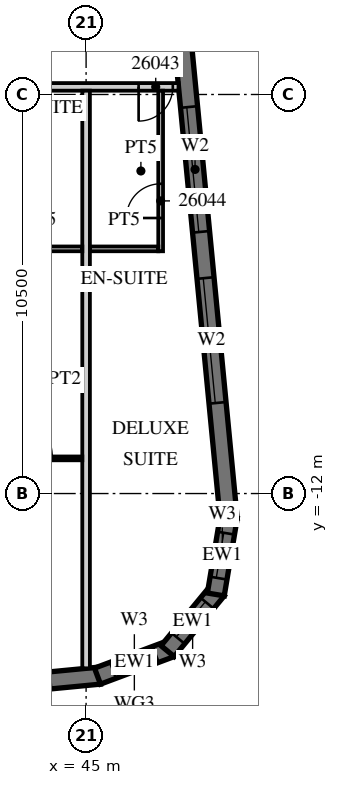
"""IFC4 building model, lengths in metres.
Left out: names, types, materials, properties, quantities, classifications, styles, units other than length and angle.
Written with IfcOpenShell. Run it as: python <this file> out.ifc"""

import sys

from ifc_helpers import new_model, si_unit, direction, frame, frame_2d, origin, place, context, subcontext, project, spatial, polyline, rectangle, outline, extrude, element, fill, save


model = new_model("IFC4")
c1 = context("Model", 3, precision=1e-05, world=origin(), true_north=direction((0.0, 1.0)))
c2 = subcontext(c1, "Body", "Model", "MODEL_VIEW")
j1 = project(units=[si_unit("LENGTHUNIT", "METRE"), si_unit("PLANEANGLEUNIT", "RADIAN")], contexts=[c1])
p1 = place(None, origin())
s1 = spatial("IfcSite", under=j1, at=p1, CompositionType="ELEMENT")
p2 = place(p1, origin())
s2 = spatial("IfcBuilding", under=s1, at=p2, CompositionType="ELEMENT")
p3 = place(p2, frame((0.0, 0.0, 120.7)))
s3 = spatial("IfcBuildingStorey", under=s2, at=p3, CompositionType="ELEMENT", Elevation=120.7)
p4 = place(p3, frame((-13.521, -22.46, 0.0), z_axis=(0.0, 0.0, 1.0), x_axis=(0.995396096335, 0.095846812164, 0.0)))
e1 = element("IfcWall", 1, at=p4, inside=s3, PredefinedType="SOLIDWALL", context=c2, shape_type="SweptSolid", body=[
    extrude(rectangle(XDim=59.151, YDim=0.45, at=frame_2d((29.575, 0.0))), origin(), (0.0, 0.0, 1.0), 3.02),
])
p5 = place(p4, frame((0.91, 0.0, 0.45)))
e2 = element("IfcOpeningElement", 2, at=p5, cuts=e1, PredefinedType="OPENING", context=c2, shape_type="SweptSolid", body=[
    extrude(rectangle(XDim=2.7, YDim=2.25, at=frame_2d((1.35, 1.125))), frame((0.0, 0.235, 0.0), z_axis=(0.0, -1.0, 0.0), x_axis=(1.0, 0.0, 0.0)), (0.0, 0.0, 1.0), 0.47),
])
p6 = place(p4, frame((5.431, 0.0, 0.45)))
e3 = element("IfcOpeningElement", 3, at=p6, cuts=e1, PredefinedType="OPENING", context=c2, shape_type="SweptSolid", body=[
    extrude(rectangle(XDim=2.7, YDim=2.25, at=frame_2d((1.35, 1.125))), frame((0.0, 0.235, 0.0), z_axis=(0.0, -1.0, 0.0), x_axis=(1.0, 0.0, 0.0)), (0.0, 0.0, 1.0), 0.47),
])
p7 = place(p4, frame((9.952, 0.0, 0.45)))
e4 = element("IfcOpeningElement", 4, at=p7, cuts=e1, PredefinedType="OPENING", context=c2, shape_type="SweptSolid", body=[
    extrude(rectangle(XDim=2.7, YDim=2.25, at=frame_2d((1.35, 1.125))), frame((0.0, 0.235, 0.0), z_axis=(0.0, -1.0, 0.0), x_axis=(1.0, 0.0, 0.0)), (0.0, 0.0, 1.0), 0.47),
])
p8 = place(p4, frame((14.473, 0.0, 0.45)))
e5 = element("IfcOpeningElement", 5, at=p8, cuts=e1, PredefinedType="OPENING", context=c2, shape_type="SweptSolid", body=[
    extrude(rectangle(XDim=2.7, YDim=2.25, at=frame_2d((1.35, 1.125))), frame((0.0, 0.235, 0.0), z_axis=(0.0, -1.0, 0.0), x_axis=(1.0, 0.0, 0.0)), (0.0, 0.0, 1.0), 0.47),
])
p9 = place(p4, frame((18.994, 0.0, 0.45)))
e6 = element("IfcOpeningElement", 6, at=p9, cuts=e1, PredefinedType="OPENING", context=c2, shape_type="SweptSolid", body=[
    extrude(rectangle(XDim=2.7, YDim=2.25, at=frame_2d((1.35, 1.125))), frame((0.0, 0.235, 0.0), z_axis=(0.0, -1.0, 0.0), x_axis=(1.0, 0.0, 0.0)), (0.0, 0.0, 1.0), 0.47),
])
p10 = place(p4, frame((23.514, 0.0, 0.45)))
e7 = element("IfcOpeningElement", 7, at=p10, cuts=e1, PredefinedType="OPENING", context=c2, shape_type="SweptSolid", body=[
    extrude(rectangle(XDim=2.7, YDim=2.25, at=frame_2d((1.35, 1.125))), frame((0.0, 0.235, 0.0), z_axis=(0.0, -1.0, 0.0), x_axis=(1.0, 0.0, 0.0)), (0.0, 0.0, 1.0), 0.47),
])
p11 = place(p4, frame((28.035, 0.0, 0.45)))
e8 = element("IfcOpeningElement", 8, at=p11, cuts=e1, PredefinedType="OPENING", context=c2, shape_type="SweptSolid", body=[
    extrude(rectangle(XDim=2.7, YDim=2.25, at=frame_2d((1.35, 1.125))), frame((0.0, 0.235, 0.0), z_axis=(0.0, -1.0, 0.0), x_axis=(1.0, 0.0, 0.0)), (0.0, 0.0, 1.0), 0.47),
])
p12 = place(p4, frame((32.556, 0.0, 0.45)))
e9 = element("IfcOpeningElement", 9, at=p12, cuts=e1, PredefinedType="OPENING", context=c2, shape_type="SweptSolid", body=[
    extrude(rectangle(XDim=2.7, YDim=2.25, at=frame_2d((1.35, 1.125))), frame((0.0, 0.235, 0.0), z_axis=(0.0, -1.0, 0.0), x_axis=(1.0, 0.0, 0.0)), (0.0, 0.0, 1.0), 0.47),
])
p13 = place(p4, frame((37.077, 0.0, 0.45)))
e10 = element("IfcOpeningElement", 10, at=p13, cuts=e1, PredefinedType="OPENING", context=c2, shape_type="SweptSolid", body=[
    extrude(rectangle(XDim=2.7, YDim=2.25, at=frame_2d((1.35, 1.125))), frame((0.0, 0.235, 0.0), z_axis=(0.0, -1.0, 0.0), x_axis=(1.0, 0.0, 0.0)), (0.0, 0.0, 1.0), 0.47),
])
p14 = place(p4, frame((41.598, 0.0, 0.45)))
e11 = element("IfcOpeningElement", 11, at=p14, cuts=e1, PredefinedType="OPENING", context=c2, shape_type="SweptSolid", body=[
    extrude(rectangle(XDim=2.7, YDim=2.25, at=frame_2d((1.35, 1.125))), frame((0.0, 0.235, 0.0), z_axis=(0.0, -1.0, 0.0), x_axis=(1.0, 0.0, 0.0)), (0.0, 0.0, 1.0), 0.47),
])
p15 = place(p4, frame((46.118, 0.0, 0.45)))
e12 = element("IfcOpeningElement", 12, at=p15, cuts=e1, PredefinedType="OPENING", context=c2, shape_type="SweptSolid", body=[
    extrude(rectangle(XDim=2.7, YDim=2.25, at=frame_2d((1.35, 1.125))), frame((0.0, 0.235, 0.0), z_axis=(0.0, -1.0, 0.0), x_axis=(1.0, 0.0, 0.0)), (0.0, 0.0, 1.0), 0.47),
])
p16 = place(p4, frame((50.639, 0.0, 0.45)))
e13 = element("IfcOpeningElement", 13, at=p16, cuts=e1, PredefinedType="OPENING", context=c2, shape_type="SweptSolid", body=[
    extrude(rectangle(XDim=2.7, YDim=2.25, at=frame_2d((1.35, 1.125))), frame((0.0, 0.235, 0.0), z_axis=(0.0, -1.0, 0.0), x_axis=(1.0, 0.0, 0.0)), (0.0, 0.0, 1.0), 0.47),
])
p17 = place(p4, frame((55.15, 0.0, 0.45)))
e14 = element("IfcOpeningElement", 14, at=p17, cuts=e1, PredefinedType="OPENING", context=c2, shape_type="SweptSolid", body=[
    extrude(rectangle(XDim=2.7, YDim=2.25, at=frame_2d((1.35, 1.125))), frame((0.0, 0.235, 0.0), z_axis=(0.0, -1.0, 0.0), x_axis=(1.0, 0.0, 0.0)), (0.0, 0.0, 1.0), 0.47),
])
p18 = place(p3, frame((45.3, -16.804, 0.0), z_axis=(0.0, 0.0, 1.0), x_axis=(0.936677599948, 0.350192909346, 0.0)))
e15 = element("IfcWall", 15, at=p18, inside=s3, PredefinedType="SOLIDWALL", context=c2, shape_type="SweptSolid", body=[
    extrude(outline(polyline([(0.0, -0.225), (2.071, -0.225), (1.95, 0.225), (0.121, 0.225), (0.0, -0.225)])), origin(), (0.0, 0.0, 1.0), 3.02),
])
p19 = place(p18, frame((0.435, 0.0, 0.45)))
e16 = element("IfcOpeningElement", 16, at=p19, cuts=e15, PredefinedType="OPENING", context=c2, shape_type="SweptSolid", body=[
    extrude(rectangle(XDim=1.2, YDim=2.25, at=frame_2d((0.6, 1.125))), frame((0.0, 0.235, 0.0), z_axis=(0.0, -1.0, 0.0), x_axis=(1.0, 0.0, 0.0)), (0.0, 0.0, 1.0), 0.47),
])
p20 = place(p3, frame((47.145, -16.147, 0.0), z_axis=(0.0, 0.0, 1.0), x_axis=(0.635988241739, 0.771698747161, 0.0)))
e17 = element("IfcWall", 17, at=p20, inside=s3, PredefinedType="SOLIDWALL", context=c2, shape_type="SweptSolid", body=[
    extrude(outline(polyline([(0.0, -0.225), (2.071, -0.225), (1.95, 0.225), (0.121, 0.225), (0.0, -0.225)])), origin(), (0.0, 0.0, 1.0), 3.02),
])
p21 = place(p20, frame((0.435, 0.0, 0.45)))
e18 = element("IfcOpeningElement", 18, at=p21, cuts=e17, PredefinedType="OPENING", context=c2, shape_type="SweptSolid", body=[
    extrude(rectangle(XDim=1.2, YDim=2.25, at=frame_2d((0.6, 1.125))), frame((0.0, 0.235, 0.0), z_axis=(0.0, -1.0, 0.0), x_axis=(1.0, 0.0, 0.0)), (0.0, 0.0, 1.0), 0.47),
])
p22 = place(p3, frame((48.413, -14.655, 0.0), z_axis=(0.0, 0.0, 1.0), x_axis=(0.165068144653, 0.986282164302, 0.0)))
e19 = element("IfcWall", 19, at=p22, inside=s3, PredefinedType="SOLIDWALL", context=c2, shape_type="SweptSolid", body=[
    extrude(outline(polyline([(0.0, -0.225), (2.071, -0.225), (1.95, 0.225), (0.121, 0.225), (0.0, -0.225)])), origin(), (0.0, 0.0, 1.0), 3.02),
])
p23 = place(p22, frame((0.435, 0.0, 0.45)))
e20 = element("IfcOpeningElement", 20, at=p23, cuts=e19, PredefinedType="OPENING", context=c2, shape_type="SweptSolid", body=[
    extrude(rectangle(XDim=1.2, YDim=2.25, at=frame_2d((0.6, 1.125))), frame((0.0, 0.235, 0.0), z_axis=(0.0, -1.0, 0.0), x_axis=(1.0, 0.0, 0.0)), (0.0, 0.0, 1.0), 0.47),
])
p24 = place(p3, frame((48.753, -12.672, 0.0), z_axis=(0.0, 0.0, 1.0), x_axis=(-0.095842661909, 0.995396495954, 0.0)))
e21 = element("IfcWall", 21, at=p24, inside=s3, PredefinedType="SOLIDWALL", context=c2, shape_type="SweptSolid", body=[
    extrude(rectangle(XDim=35.0, YDim=0.45, at=frame_2d((17.5, 0.0))), origin(), (0.0, 0.0, 1.0), 3.02),
])
p25 = place(p24, frame((3.072, 0.0, 0.45)))
e22 = element("IfcOpeningElement", 22, at=p25, cuts=e21, PredefinedType="OPENING", context=c2, shape_type="SweptSolid", body=[
    extrude(rectangle(XDim=3.3, YDim=2.25, at=frame_2d((1.65, 1.125))), frame((0.0, 0.235, 0.0), z_axis=(0.0, -1.0, 0.0), x_axis=(1.0, 0.0, 0.0)), (0.0, 0.0, 1.0), 0.47),
])
p26 = place(p24, frame((7.593, 0.0, 0.45)))
e23 = element("IfcOpeningElement", 23, at=p26, cuts=e21, PredefinedType="OPENING", context=c2, shape_type="SweptSolid", body=[
    extrude(rectangle(XDim=3.3, YDim=2.25, at=frame_2d((1.65, 1.125))), frame((0.0, 0.235, 0.0), z_axis=(0.0, -1.0, 0.0), x_axis=(1.0, 0.0, 0.0)), (0.0, 0.0, 1.0), 0.47),
])
p27 = place(p3, frame((-13.5, -1.3, 0.0), z_axis=(0.0, 0.0, 1.0), x_axis=(1.0, 0.0, 0.0)))
e24 = element("IfcWall", 24, at=p27, inside=s3, PredefinedType="PARTITIONING", context=c2, shape_type="SweptSolid", body=[
    extrude(rectangle(XDim=60.932, YDim=0.2, at=frame_2d((30.466, 0.0))), origin(), (0.0, 0.0, 1.0), 3.02),
])
p28 = place(p27, frame((2.925, 0.0, 0.0)))
e25 = element("IfcOpeningElement", 25, at=p28, cuts=e24, PredefinedType="OPENING", context=c2, shape_type="SweptSolid", body=[
    extrude(rectangle(XDim=1.0, YDim=2.1, at=frame_2d((0.5, 1.05))), frame((0.0, 0.11, 0.0), z_axis=(0.0, -1.0, 0.0), x_axis=(1.0, 0.0, 0.0)), (0.0, 0.0, 1.0), 0.22),
])
p29 = place(p27, frame((9.863, 0.0, 0.0)))
e26 = element("IfcOpeningElement", 26, at=p29, cuts=e24, PredefinedType="OPENING", context=c2, shape_type="SweptSolid", body=[
    extrude(rectangle(XDim=1.2, YDim=2.1, at=frame_2d((0.6, 1.05))), frame((0.0, 0.11, 0.0), z_axis=(0.0, -1.0, 0.0), x_axis=(1.0, 0.0, 0.0)), (0.0, 0.0, 1.0), 0.22),
])
p30 = place(p27, frame((15.938, 0.0, 0.0)))
e27 = element("IfcOpeningElement", 27, at=p30, cuts=e24, PredefinedType="OPENING", context=c2, shape_type="SweptSolid", body=[
    extrude(rectangle(XDim=1.2, YDim=2.1, at=frame_2d((0.6, 1.05))), frame((0.0, 0.11, 0.0), z_axis=(0.0, -1.0, 0.0), x_axis=(1.0, 0.0, 0.0)), (0.0, 0.0, 1.0), 0.22),
])
p31 = place(p27, frame((27.862, 0.0, 0.0)))
e28 = element("IfcOpeningElement", 28, at=p31, cuts=e24, PredefinedType="OPENING", context=c2, shape_type="SweptSolid", body=[
    extrude(rectangle(XDim=1.2, YDim=2.1, at=frame_2d((0.6, 1.05))), frame((0.0, 0.11, 0.0), z_axis=(0.0, -1.0, 0.0), x_axis=(1.0, 0.0, 0.0)), (0.0, 0.0, 1.0), 0.22),
])
p32 = place(p27, frame((34.45, 0.0, 0.0)))
e29 = element("IfcOpeningElement", 29, at=p32, cuts=e24, PredefinedType="OPENING", context=c2, shape_type="SweptSolid", body=[
    extrude(rectangle(XDim=1.0, YDim=2.1, at=frame_2d((0.5, 1.05))), frame((0.0, 0.11, 0.0), z_axis=(0.0, -1.0, 0.0), x_axis=(1.0, 0.0, 0.0)), (0.0, 0.0, 1.0), 0.22),
])
p33 = place(p27, frame((36.55, 0.0, 0.0)))
e30 = element("IfcOpeningElement", 30, at=p33, cuts=e24, PredefinedType="OPENING", context=c2, shape_type="SweptSolid", body=[
    extrude(rectangle(XDim=1.0, YDim=2.1, at=frame_2d((0.5, 1.05))), frame((0.0, 0.11, 0.0), z_axis=(0.0, -1.0, 0.0), x_axis=(1.0, 0.0, 0.0)), (0.0, 0.0, 1.0), 0.22),
])
p34 = place(p27, frame((41.075, 0.0, 0.0)))
e31 = element("IfcOpeningElement", 31, at=p34, cuts=e24, PredefinedType="OPENING", context=c2, shape_type="SweptSolid", body=[
    extrude(rectangle(XDim=1.0, YDim=2.1, at=frame_2d((0.5, 1.05))), frame((0.0, 0.11, 0.0), z_axis=(0.0, -1.0, 0.0), x_axis=(1.0, 0.0, 0.0)), (0.0, 0.0, 1.0), 0.22),
])
p35 = place(p27, frame((45.55, 0.0, 0.0)))
e32 = element("IfcOpeningElement", 32, at=p35, cuts=e24, PredefinedType="OPENING", context=c2, shape_type="SweptSolid", body=[
    extrude(rectangle(XDim=1.0, YDim=2.1, at=frame_2d((0.5, 1.05))), frame((0.0, 0.11, 0.0), z_axis=(0.0, -1.0, 0.0), x_axis=(1.0, 0.0, 0.0)), (0.0, 0.0, 1.0), 0.22),
])
p36 = place(p27, frame((50.075, 0.0, 0.0)))
e33 = element("IfcOpeningElement", 33, at=p36, cuts=e24, PredefinedType="OPENING", context=c2, shape_type="SweptSolid", body=[
    extrude(rectangle(XDim=1.0, YDim=2.1, at=frame_2d((0.5, 1.05))), frame((0.0, 0.11, 0.0), z_axis=(0.0, -1.0, 0.0), x_axis=(1.0, 0.0, 0.0)), (0.0, 0.0, 1.0), 0.22),
])
p37 = place(p27, frame((54.575, 0.0, 0.0)))
e34 = element("IfcOpeningElement", 34, at=p37, cuts=e24, PredefinedType="OPENING", context=c2, shape_type="SweptSolid", body=[
    extrude(rectangle(XDim=1.0, YDim=2.1, at=frame_2d((0.5, 1.05))), frame((0.0, 0.11, 0.0), z_axis=(0.0, -1.0, 0.0), x_axis=(1.0, 0.0, 0.0)), (0.0, 0.0, 1.0), 0.22),
])
p38 = place(p27, frame((59.882, 0.0, 0.0)))
e35 = element("IfcOpeningElement", 35, at=p38, cuts=e24, PredefinedType="OPENING", context=c2, shape_type="SweptSolid", body=[
    extrude(rectangle(XDim=0.9, YDim=2.1, at=frame_2d((0.45, 1.05))), frame((0.0, 0.11, 0.0), z_axis=(0.0, -1.0, 0.0), x_axis=(1.0, 0.0, 0.0)), (0.0, 0.0, 1.0), 0.22),
])
p39 = place(p3, frame((45.0, -16.599, 0.0), z_axis=(0.0, 0.0, 1.0), x_axis=(0.0, 1.0, 0.0)))
e36 = element("IfcWall", 36, at=p39, inside=s3, PredefinedType="PARTITIONING", context=c2, shape_type="SweptSolid", body=[
    extrude(rectangle(XDim=15.199, YDim=0.2, at=frame_2d((7.6, 0.0))), origin(), (0.0, 0.0, 1.0), 3.02),
])
p40 = place(p3, frame((42.65, -5.562, 0.0), z_axis=(0.0, 0.0, 1.0), x_axis=(1.0, 0.0, 0.0)))
e37 = element("IfcWall", 37, at=p40, inside=s3, PredefinedType="PARTITIONING", context=c2, shape_type="SweptSolid", body=[
    extrude(rectangle(XDim=2.25, YDim=0.125, at=frame_2d((1.125, 0.0))), origin(), (0.0, 0.0, 1.0), 3.02),
])
p41 = place(p3, frame((40.625, -11.075, 0.0), z_axis=(0.0, 0.0, 1.0), x_axis=(1.0, 0.0, 0.0)))
e38 = element("IfcWall", 38, at=p41, inside=s3, PredefinedType="PARTITIONING", context=c2, shape_type="SweptSolid", body=[
    extrude(rectangle(XDim=4.275, YDim=0.1, at=frame_2d((2.137, 0.0))), origin(), (0.0, 0.0, 1.0), 3.02),
])
p42 = place(p41, frame((1.988, 0.0, 0.0)))
e39 = element("IfcOpeningElement", 39, at=p42, cuts=e38, PredefinedType="OPENING", context=c2, shape_type="SweptSolid", body=[
    extrude(rectangle(XDim=1.5, YDim=2.1, at=frame_2d((0.75, 1.05))), frame((0.0, 0.06, 0.0), z_axis=(0.0, -1.0, 0.0), x_axis=(1.0, 0.0, 0.0)), (0.0, 0.0, 1.0), 0.12),
])
p43 = place(p3, frame((46.962, -5.625, 0.0), z_axis=(0.0, 0.0, 1.0), x_axis=(0.0, 1.0, 0.0)))
e40 = element("IfcWall", 40, at=p43, inside=s3, PredefinedType="PARTITIONING", context=c2, shape_type="SweptSolid", body=[
    extrude(rectangle(XDim=4.225, YDim=0.125, at=frame_2d((2.113, 0.0))), origin(), (0.0, 0.0, 1.0), 3.02),
])
p44 = place(p43, frame((0.875, 0.0, 0.0)))
e41 = element("IfcOpeningElement", 41, at=p44, cuts=e40, PredefinedType="OPENING", context=c2, shape_type="SweptSolid", body=[
    extrude(rectangle(XDim=0.9, YDim=2.1, at=frame_2d((0.45, 1.05))), frame((0.0, 0.073, 0.0), z_axis=(0.0, -1.0, 0.0), x_axis=(1.0, 0.0, 0.0)), (0.0, 0.0, 1.0), 0.145),
])
p45 = place(p3, frame((45.1, -5.562, 0.0), z_axis=(0.0, 0.0, 1.0), x_axis=(1.0, 0.0, 0.0)))
e42 = element("IfcWall", 42, at=p45, inside=s3, PredefinedType="PARTITIONING", context=c2, shape_type="SweptSolid", body=[
    extrude(rectangle(XDim=1.8, YDim=0.125, at=frame_2d((0.9, 0.0))), origin(), (0.0, 0.0, 1.0), 3.02),
])
p46 = place(p19, origin())
e43 = element("IfcWindow", 43, at=p46, inside=s3, PartitioningType="SINGLE_PANEL", PredefinedType="WINDOW", context=c2, shape_type="SweptSolid", body=[
    extrude(rectangle(XDim=1.2, YDim=2.25, at=frame_2d((0.6, 1.125))), frame((0.0, 0.09, 0.0), z_axis=(0.0, -1.0, 0.0), x_axis=(1.0, 0.0, 0.0)), (0.0, 0.0, 1.0), 0.06),
])
fill(e16, e43)
p47 = place(p21, origin())
e44 = element("IfcWindow", 44, at=p47, inside=s3, PartitioningType="SINGLE_PANEL", PredefinedType="WINDOW", context=c2, shape_type="SweptSolid", body=[
    extrude(rectangle(XDim=1.2, YDim=2.25, at=frame_2d((0.6, 1.125))), frame((0.0, 0.09, 0.0), z_axis=(0.0, -1.0, 0.0), x_axis=(1.0, 0.0, 0.0)), (0.0, 0.0, 1.0), 0.06),
])
fill(e18, e44)
p48 = place(p23, origin())
e45 = element("IfcWindow", 45, at=p48, inside=s3, PartitioningType="SINGLE_PANEL", PredefinedType="WINDOW", context=c2, shape_type="SweptSolid", body=[
    extrude(rectangle(XDim=1.2, YDim=2.25, at=frame_2d((0.6, 1.125))), frame((0.0, 0.09, 0.0), z_axis=(0.0, -1.0, 0.0), x_axis=(1.0, 0.0, 0.0)), (0.0, 0.0, 1.0), 0.06),
])
fill(e20, e45)
p49 = place(p25, origin())
e46 = element("IfcWindow", 46, at=p49, inside=s3, PartitioningType="SINGLE_PANEL", PredefinedType="WINDOW", context=c2, shape_type="SweptSolid", body=[
    extrude(rectangle(XDim=3.3, YDim=2.25, at=frame_2d((1.65, 1.125))), frame((0.0, 0.09, 0.0), z_axis=(0.0, -1.0, 0.0), x_axis=(1.0, 0.0, 0.0)), (0.0, 0.0, 1.0), 0.06),
])
fill(e22, e46)
p50 = place(p26, origin())
e47 = element("IfcWindow", 47, at=p50, inside=s3, PartitioningType="SINGLE_PANEL", PredefinedType="WINDOW", context=c2, shape_type="SweptSolid", body=[
    extrude(rectangle(XDim=3.3, YDim=2.25, at=frame_2d((1.65, 1.125))), frame((0.0, 0.09, 0.0), z_axis=(0.0, -1.0, 0.0), x_axis=(1.0, 0.0, 0.0)), (0.0, 0.0, 1.0), 0.06),
])
fill(e23, e47)
p51 = place(p42, origin())
e48 = element("IfcDoor", 48, at=p51, inside=s3, OperationType="SINGLE_SWING_LEFT", PredefinedType="DOOR", context=c2, shape_type="SweptSolid", body=[
    extrude(rectangle(XDim=1.5, YDim=2.1, at=frame_2d((0.75, 1.05))), frame((0.0, 0.025, 0.0), z_axis=(0.0, -1.0, 0.0), x_axis=(1.0, 0.0, 0.0)), (0.0, 0.0, 1.0), 0.05),
])
fill(e39, e48)
p52 = place(p38, origin())
e49 = element("IfcDoor", 49, at=p52, inside=s3, OperationType="SINGLE_SWING_LEFT", PredefinedType="DOOR", context=c2, shape_type="SweptSolid", body=[
    extrude(rectangle(XDim=0.9, YDim=2.1, at=frame_2d((0.45, 1.05))), frame((0.0, 0.025, 0.0), z_axis=(0.0, -1.0, 0.0), x_axis=(1.0, 0.0, 0.0)), (0.0, 0.0, 1.0), 0.05),
])
fill(e35, e49)
p53 = place(p44, origin())
e50 = element("IfcDoor", 50, at=p53, inside=s3, OperationType="SINGLE_SWING_LEFT", PredefinedType="DOOR", context=c2, shape_type="SweptSolid", body=[
    extrude(rectangle(XDim=0.9, YDim=2.1, at=frame_2d((0.45, 1.05))), frame((0.0, 0.025, 0.0), z_axis=(0.0, -1.0, 0.0), x_axis=(1.0, 0.0, 0.0)), (0.0, 0.0, 1.0), 0.05),
])
fill(e41, e50)
save(model, sys.argv[1])
